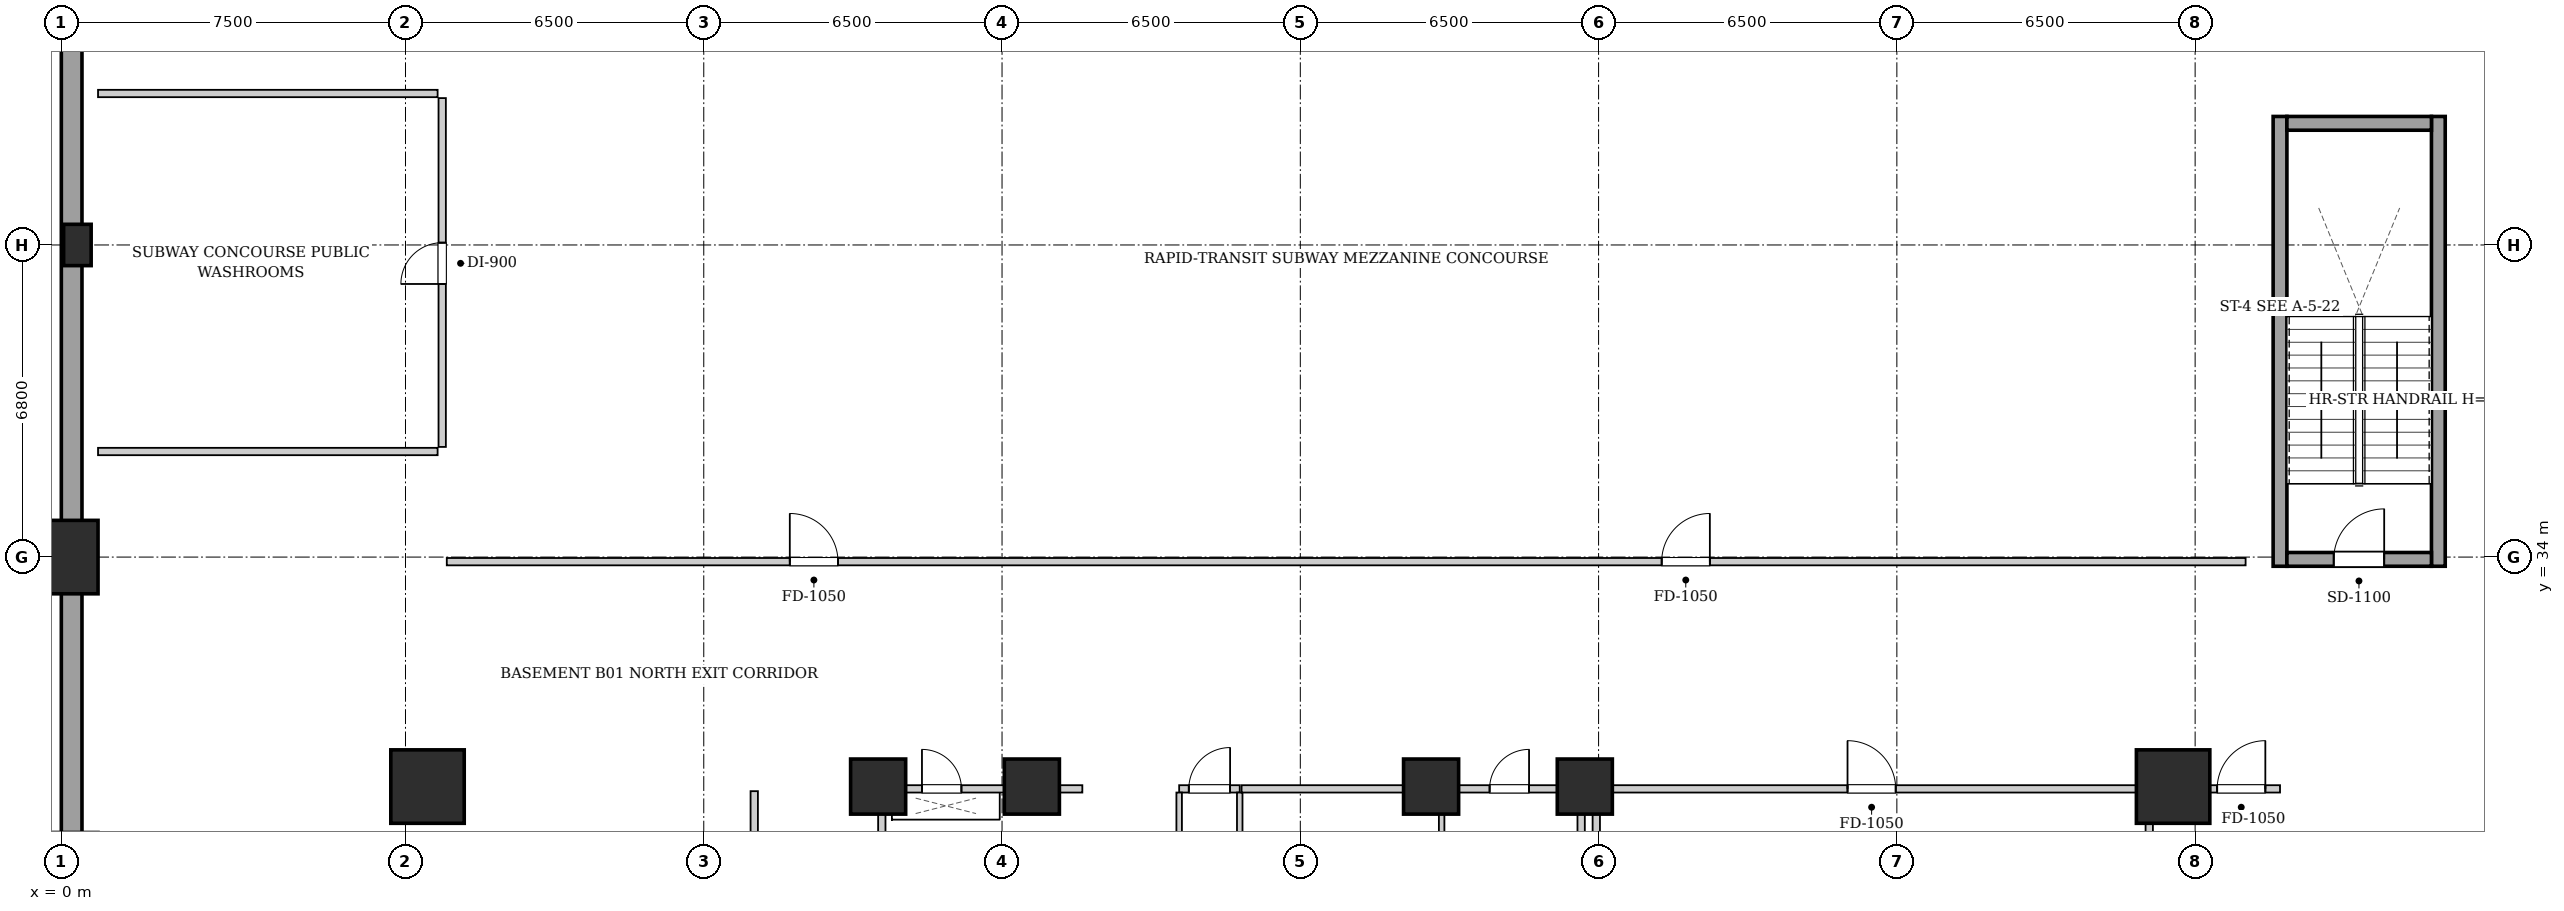
"""IFC4 building model, lengths in metres.
Left out: names, types, materials, properties, quantities, classifications, styles, units other than length and angle.
Written with IfcOpenShell. Run it as: python <this file> out.ifc"""

import sys

from ifc_helpers import new_model, si_unit, direction, frame, frame_2d, origin, origin_2d, place, context, subcontext, project, spatial, rectangle, extrude, element, fill, save


model = new_model("IFC4")
c1 = context("Model", 3, precision=1e-05, world=origin(), true_north=direction((0.0, 1.0)))
c2 = subcontext(c1, "Body", "Model", "MODEL_VIEW")
j1 = project(units=[si_unit("LENGTHUNIT", "METRE"), si_unit("PLANEANGLEUNIT", "RADIAN")], contexts=[c1])
p1 = place(None, origin())
s1 = spatial("IfcSite", under=j1, at=p1, CompositionType="ELEMENT")
p2 = place(p1, origin())
s2 = spatial("IfcBuilding", under=s1, at=p2, CompositionType="ELEMENT")
p3 = place(p2, frame((0.0, 0.0, -4.8)))
s3 = spatial("IfcBuildingStorey", under=s2, at=p3, CompositionType="ELEMENT", Elevation=-4.8)
for number, where, z_axis, x_axis in (
    (1, (0.0, 34.0, 0.0), (0.0, 0.0, 1.0), (1.0, 0.0, 0.0)),
    (2, (7.98, 29.0, 0.0), (0.0, 0.0, 1.0), (1.0, 0.0, 0.0)),
    (3, (46.02, 29.0, 0.0), (0.0, 0.0, 1.0), (1.0, 0.0, 0.0)),
):
    element("IfcColumn", number, at=place(p3, frame(where, z_axis=z_axis, x_axis=x_axis)), inside=s3, PredefinedType="COLUMN", context=c2, shape_type="SweptSolid", body=[
        extrude(rectangle(XDim=1.6, YDim=1.6, at=origin_2d()), origin(), (0.0, 0.0, 1.0), 4.8),
    ])
for number, where, z_axis, x_axis in (
    (4, (17.8, 29.0, 0.0), (0.0, 0.0, 1.0), (1.0, 0.0, 0.0)),
    (5, (21.15, 29.0, 0.0), (0.0, 0.0, 1.0), (1.0, 0.0, 0.0)),
    (6, (29.85, 29.0, 0.0), (0.0, 0.0, 1.0), (1.0, 0.0, 0.0)),
    (7, (33.2, 29.0, 0.0), (0.0, 0.0, 1.0), (1.0, 0.0, 0.0)),
):
    element("IfcColumn", number, at=place(p3, frame(where, z_axis=z_axis, x_axis=x_axis)), inside=s3, PredefinedType="COLUMN", context=c2, shape_type="SweptSolid", body=[
        extrude(rectangle(XDim=1.2, YDim=1.2, at=origin_2d()), origin(), (0.0, 0.0, 1.0), 4.8),
    ])
p4 = place(p3, frame((0.35, 40.8, 0.0), z_axis=(0.0, 0.0, 1.0), x_axis=(1.0, 0.0, 0.0)))
e8 = element("IfcColumn", 8, at=p4, inside=s3, PredefinedType="PILASTER", context=c2, shape_type="SweptSolid", body=[
    extrude(rectangle(XDim=0.6, YDim=0.9, at=origin_2d()), origin(), (0.0, 0.0, 1.0), 4.8),
])
p5 = place(p3, frame((0.225, 0.0, 0.0), z_axis=(0.0, 0.0, 1.0), x_axis=(0.0, 1.0, 0.0)))
e9 = element("IfcWall", 9, at=p5, inside=s3, PredefinedType="USERDEFINED", context=c2, shape_type="SweptSolid", body=[
    extrude(rectangle(XDim=47.6, YDim=0.45, at=frame_2d((23.8, 0.0))), origin(), (0.0, 0.0, 1.0), 4.48),
])
for number, where, z_axis, x_axis in (
    (10, (48.35, 33.8, 0.0), (0.0, 0.0, 1.0), (0.0, 1.0, 0.0)),
    (11, (51.8, 33.8, 0.0), (0.0, 0.0, 1.0), (0.0, 1.0, 0.0)),
):
    element("IfcWall", number, at=place(p3, frame(where, z_axis=z_axis, x_axis=x_axis)), inside=s3, PredefinedType="SHEAR", context=c2, shape_type="SweptSolid", body=[
        extrude(rectangle(XDim=9.8, YDim=0.3, at=frame_2d((4.9, 0.0))), origin(), (0.0, 0.0, 1.0), 4.48),
    ])
p6 = place(p3, frame((48.5, 43.45, 0.0), z_axis=(0.0, 0.0, 1.0), x_axis=(1.0, 0.0, 0.0)))
e12 = element("IfcWall", 12, at=p6, inside=s3, PredefinedType="SHEAR", context=c2, shape_type="SweptSolid", body=[
    extrude(rectangle(XDim=3.15, YDim=0.3, at=frame_2d((1.575, 0.0))), origin(), (0.0, 0.0, 1.0), 4.48),
])
p7 = place(p3, frame((48.5, 33.95, 0.0), z_axis=(0.0, 0.0, 1.0), x_axis=(1.0, 0.0, 0.0)))
e13 = element("IfcWall", 13, at=p7, inside=s3, PredefinedType="SHEAR", context=c2, shape_type="SweptSolid", body=[
    extrude(rectangle(XDim=3.15, YDim=0.3, at=frame_2d((1.575, 0.0))), origin(), (0.0, 0.0, 1.0), 4.48),
])
p8 = place(p7, frame((1.02, 0.0, 0.0)))
e14 = element("IfcOpeningElement", 14, at=p8, cuts=e13, PredefinedType="OPENING", context=c2, shape_type="SweptSolid", body=[
    extrude(rectangle(XDim=1.1, YDim=2.05, at=frame_2d((0.55, 1.025))), frame((0.0, 0.16, 0.0), z_axis=(0.0, -1.0, 0.0), x_axis=(1.0, 0.0, 0.0)), (0.0, 0.0, 1.0), 0.32),
])
for number, where, z_axis, x_axis in (
    (15, (17.88, 24.12, 0.0), (0.0, 0.0, 1.0), (0.0, 1.0, 0.0)),
    (16, (33.12, 24.12, 0.0), (0.0, 0.0, 1.0), (0.0, 1.0, 0.0)),
):
    element("IfcWall", number, at=place(p3, frame(where, z_axis=z_axis, x_axis=x_axis)), inside=s3, PredefinedType="PARTITIONING", context=c2, shape_type="SweptSolid", body=[
        extrude(rectangle(XDim=4.76, YDim=0.16, at=frame_2d((2.38, 0.0))), origin(), (0.0, 0.0, 1.0), 4.48),
    ])
p9 = place(p3, frame((24.36, 28.95, 0.0), z_axis=(0.0, 0.0, 1.0), x_axis=(1.0, 0.0, 0.0)))
e17 = element("IfcWall", 17, at=p9, inside=s3, PredefinedType="PARTITIONING", context=c2, shape_type="SweptSolid", body=[
    extrude(rectangle(XDim=1.32, YDim=0.16, at=frame_2d((0.66, 0.0))), origin(), (0.0, 0.0, 1.0), 4.48),
])
p10 = place(p9, frame((0.21, 0.0, 0.0)))
e18 = element("IfcOpeningElement", 18, at=p10, cuts=e17, PredefinedType="OPENING", context=c2, shape_type="SweptSolid", body=[
    extrude(rectangle(XDim=0.9, YDim=2.05, at=frame_2d((0.45, 1.025))), frame((0.0, 0.09, 0.0), z_axis=(0.0, -1.0, 0.0), x_axis=(1.0, 0.0, 0.0)), (0.0, 0.0, 1.0), 0.18),
])
p11 = place(p3, frame((17.96, 28.95, 0.0), z_axis=(0.0, 0.0, 1.0), x_axis=(1.0, 0.0, 0.0)))
e19 = element("IfcWall", 19, at=p11, inside=s3, PredefinedType="PARTITIONING", context=c2, shape_type="SweptSolid", body=[
    extrude(rectangle(XDim=4.29, YDim=0.16, at=frame_2d((2.145, 0.0))), origin(), (0.0, 0.0, 1.0), 4.48),
])
p12 = place(p11, frame((0.795, 0.0, 0.0)))
e20 = element("IfcOpeningElement", 20, at=p12, cuts=e19, PredefinedType="OPENING", context=c2, shape_type="SweptSolid", body=[
    extrude(rectangle(XDim=0.86, YDim=2.05, at=frame_2d((0.43, 1.025))), frame((0.0, 0.09, 0.0), z_axis=(0.0, -1.0, 0.0), x_axis=(1.0, 0.0, 0.0)), (0.0, 0.0, 1.0), 0.18),
])
for number, where, z_axis, x_axis in (
    (21, (24.36, 26.6, 0.0), (0.0, 0.0, 1.0), (0.0, 1.0, 0.0)),
    (22, (25.68, 26.6, 0.0), (0.0, 0.0, 1.0), (0.0, 1.0, 0.0)),
):
    element("IfcWall", number, at=place(p3, frame(where, z_axis=z_axis, x_axis=x_axis)), inside=s3, PredefinedType="PARTITIONING", context=c2, shape_type="SweptSolid", body=[
        extrude(rectangle(XDim=2.27, YDim=0.12, at=frame_2d((1.135, 0.0))), origin(), (0.0, 0.0, 1.0), 4.48),
    ])
p13 = place(p3, frame((30.08, 26.18, 0.0), z_axis=(0.0, 0.0, 1.0), x_axis=(0.0, 1.0, 0.0)))
e23 = element("IfcWall", 23, at=p13, inside=s3, PredefinedType="PARTITIONING", context=c2, shape_type="SweptSolid", body=[
    extrude(rectangle(XDim=2.68, YDim=0.12, at=frame_2d((1.34, 0.0))), origin(), (0.0, 0.0, 1.0), 4.48),
])
p14 = place(p3, frame((30.08, 28.95, 0.0), z_axis=(0.0, 0.0, 1.0), x_axis=(1.0, 0.0, 0.0)))
e24 = element("IfcWall", 24, at=p14, inside=s3, PredefinedType="PARTITIONING", context=c2, shape_type="SweptSolid", body=[
    extrude(rectangle(XDim=2.96, YDim=0.16, at=frame_2d((1.48, 0.0))), origin(), (0.0, 0.0, 1.0), 4.48),
])
p15 = place(p14, frame((1.045, 0.0, 0.0)))
e25 = element("IfcOpeningElement", 25, at=p15, cuts=e24, PredefinedType="OPENING", context=c2, shape_type="SweptSolid", body=[
    extrude(rectangle(XDim=0.86, YDim=2.05, at=frame_2d((0.43, 1.025))), frame((0.0, 0.09, 0.0), z_axis=(0.0, -1.0, 0.0), x_axis=(1.0, 0.0, 0.0)), (0.0, 0.0, 1.0), 0.18),
])
p16 = place(p3, frame((25.72, 28.95, 0.0), z_axis=(0.0, 0.0, 1.0), x_axis=(1.0, 0.0, 0.0)))
e26 = element("IfcWall", 26, at=p16, inside=s3, PredefinedType="PARTITIONING", context=c2, shape_type="SweptSolid", body=[
    extrude(rectangle(XDim=4.3, YDim=0.16, at=frame_2d((2.15, 0.0))), origin(), (0.0, 0.0, 1.0), 4.48),
])
p17 = place(p3, frame((8.4, 33.9, 0.0), z_axis=(0.0, 0.0, 1.0), x_axis=(1.0, 0.0, 0.0)))
e27 = element("IfcWall", 27, at=p17, inside=s3, PredefinedType="PARTITIONING", context=c2, shape_type="SweptSolid", body=[
    extrude(rectangle(XDim=39.2, YDim=0.16, at=frame_2d((19.6, 0.0))), origin(), (0.0, 0.0, 1.0), 4.48),
])
p18 = place(p17, frame((7.475, 0.0, 0.0)))
e28 = element("IfcOpeningElement", 28, at=p18, cuts=e27, PredefinedType="OPENING", context=c2, shape_type="SweptSolid", body=[
    extrude(rectangle(XDim=1.05, YDim=2.05, at=frame_2d((0.525, 1.025))), frame((0.0, 0.09, 0.0), z_axis=(0.0, -1.0, 0.0), x_axis=(1.0, 0.0, 0.0)), (0.0, 0.0, 1.0), 0.18),
])
p19 = place(p17, frame((26.475, 0.0, 0.0)))
e29 = element("IfcOpeningElement", 29, at=p19, cuts=e27, PredefinedType="OPENING", context=c2, shape_type="SweptSolid", body=[
    extrude(rectangle(XDim=1.05, YDim=2.05, at=frame_2d((0.525, 1.025))), frame((0.0, 0.09, 0.0), z_axis=(0.0, -1.0, 0.0), x_axis=(1.0, 0.0, 0.0)), (0.0, 0.0, 1.0), 0.18),
])
p20 = place(p3, frame((8.3, 36.4, 0.0), z_axis=(0.0, 0.0, 1.0), x_axis=(0.0, 1.0, 0.0)))
e30 = element("IfcWall", 30, at=p20, inside=s3, PredefinedType="PARTITIONING", context=c2, shape_type="SweptSolid", body=[
    extrude(rectangle(XDim=7.6, YDim=0.16, at=frame_2d((3.8, 0.0))), origin(), (0.0, 0.0, 1.0), 4.48),
])
p21 = place(p20, frame((3.55, 0.0, 0.0)))
e31 = element("IfcOpeningElement", 31, at=p21, cuts=e30, PredefinedType="OPENING", context=c2, shape_type="SweptSolid", body=[
    extrude(rectangle(XDim=0.9, YDim=2.05, at=frame_2d((0.45, 1.025))), frame((0.0, 0.09, 0.0), z_axis=(0.0, -1.0, 0.0), x_axis=(1.0, 0.0, 0.0)), (0.0, 0.0, 1.0), 0.18),
])
for number, where, z_axis, x_axis in (
    (32, (0.8, 44.1, 0.0), (0.0, 0.0, 1.0), (1.0, 0.0, 0.0)),
    (33, (0.8, 36.3, 0.0), (0.0, 0.0, 1.0), (1.0, 0.0, 0.0)),
):
    element("IfcWall", number, at=place(p3, frame(where, z_axis=z_axis, x_axis=x_axis)), inside=s3, PredefinedType="PARTITIONING", context=c2, shape_type="SweptSolid", body=[
        extrude(rectangle(XDim=7.4, YDim=0.16, at=frame_2d((3.7, 0.0))), origin(), (0.0, 0.0, 1.0), 4.48),
    ])
p22 = place(p3, frame((15.1, 15.1, 0.0), z_axis=(0.0, 0.0, 1.0), x_axis=(0.0, 1.0, 0.0)))
e34 = element("IfcWall", 34, at=p22, inside=s3, PredefinedType="PARTITIONING", context=c2, shape_type="SweptSolid", body=[
    extrude(rectangle(XDim=13.8, YDim=0.16, at=frame_2d((6.9, 0.0))), origin(), (0.0, 0.0, 1.0), 4.48),
])
p23 = place(p22, frame((6.475, 0.0, 0.0)))
e35 = element("IfcOpeningElement", 35, at=p23, cuts=e34, PredefinedType="OPENING", context=c2, shape_type="SweptSolid", body=[
    extrude(rectangle(XDim=1.05, YDim=2.05, at=frame_2d((0.525, 1.025))), frame((0.0, 0.09, 0.0), z_axis=(0.0, -1.0, 0.0), x_axis=(1.0, 0.0, 0.0)), (0.0, 0.0, 1.0), 0.18),
])
p24 = place(p3, frame((33.45, 28.95, 0.0), z_axis=(0.0, 0.0, 1.0), x_axis=(1.0, 0.0, 0.0)))
e36 = element("IfcWall", 36, at=p24, inside=s3, PredefinedType="PARTITIONING", context=c2, shape_type="SweptSolid", body=[
    extrude(rectangle(XDim=12.05, YDim=0.16, at=frame_2d((6.025, 0.0))), origin(), (0.0, 0.0, 1.0), 3.565),
])
p25 = place(p24, frame((5.475, 0.0, 0.0)))
e37 = element("IfcOpeningElement", 37, at=p25, cuts=e36, PredefinedType="OPENING", context=c2, shape_type="SweptSolid", body=[
    extrude(rectangle(XDim=1.05, YDim=2.05, at=frame_2d((0.525, 1.025))), frame((0.0, 0.09, 0.0), z_axis=(0.0, -1.0, 0.0), x_axis=(1.0, 0.0, 0.0)), (0.0, 0.0, 1.0), 0.18),
])
p26 = place(p3, frame((33.45, 15.1, 0.0), z_axis=(0.0, 0.0, 1.0), x_axis=(0.0, 1.0, 0.0)))
e38 = element("IfcWall", 38, at=p26, inside=s3, PredefinedType="PARTITIONING", context=c2, shape_type="SweptSolid", body=[
    extrude(rectangle(XDim=13.78, YDim=0.16, at=frame_2d((6.89, 0.0))), origin(), (0.0, 0.0, 1.0), 4.48),
])
p27 = place(p3, frame((45.5, 8.0, 0.0), z_axis=(0.0, 0.0, 1.0), x_axis=(0.0, 1.0, 0.0)))
e39 = element("IfcWall", 39, at=p27, inside=s3, PredefinedType="PARTITIONING", context=c2, shape_type="SweptSolid", body=[
    extrude(rectangle(XDim=20.95, YDim=0.16, at=frame_2d((10.475, 0.0))), origin(), (0.0, 0.0, 1.0), 4.48),
])
p28 = place(p3, frame((45.6, 28.95, 0.0), z_axis=(0.0, 0.0, 1.0), x_axis=(1.0, 0.0, 0.0)))
e40 = element("IfcWall", 40, at=p28, inside=s3, PredefinedType="PARTITIONING", context=c2, shape_type="SweptSolid", body=[
    extrude(rectangle(XDim=2.75, YDim=0.16, at=frame_2d((1.375, 0.0))), origin(), (0.0, 0.0, 1.0), 3.565),
])
p29 = place(p28, frame((1.38, 0.0, 0.0)))
e41 = element("IfcOpeningElement", 41, at=p29, cuts=e40, PredefinedType="OPENING", context=c2, shape_type="SweptSolid", body=[
    extrude(rectangle(XDim=1.05, YDim=2.05, at=frame_2d((0.525, 1.025))), frame((0.0, 0.09, 0.0), z_axis=(0.0, -1.0, 0.0), x_axis=(1.0, 0.0, 0.0)), (0.0, 0.0, 1.0), 0.18),
])
p30 = place(p8, origin())
e42 = element("IfcDoor", 42, at=p30, inside=s3, OperationType="SINGLE_SWING_RIGHT", PredefinedType="DOOR", context=c2, shape_type="SweptSolid", body=[
    extrude(rectangle(XDim=1.1, YDim=2.05, at=frame_2d((0.55, 1.025))), frame((0.0, 0.025, 0.0), z_axis=(0.0, -1.0, 0.0), x_axis=(1.0, 0.0, 0.0)), (0.0, 0.0, 1.0), 0.05),
])
fill(e14, e42)
p31 = place(p10, origin())
e43 = element("IfcDoor", 43, at=p31, inside=s3, OperationType="SINGLE_SWING_RIGHT", PredefinedType="DOOR", context=c2, shape_type="SweptSolid", body=[
    extrude(rectangle(XDim=0.9, YDim=2.05, at=frame_2d((0.45, 1.025))), frame((0.0, 0.025, 0.0), z_axis=(0.0, -1.0, 0.0), x_axis=(1.0, 0.0, 0.0)), (0.0, 0.0, 1.0), 0.05),
])
fill(e18, e43)
p32 = place(p12, origin())
e44 = element("IfcDoor", 44, at=p32, inside=s3, OperationType="SINGLE_SWING_LEFT", PredefinedType="DOOR", context=c2, shape_type="SweptSolid", body=[
    extrude(rectangle(XDim=0.86, YDim=2.05, at=frame_2d((0.43, 1.025))), frame((0.0, 0.025, 0.0), z_axis=(0.0, -1.0, 0.0), x_axis=(1.0, 0.0, 0.0)), (0.0, 0.0, 1.0), 0.05),
])
fill(e20, e44)
p33 = place(p15, origin())
e45 = element("IfcDoor", 45, at=p33, inside=s3, OperationType="SINGLE_SWING_RIGHT", PredefinedType="DOOR", context=c2, shape_type="SweptSolid", body=[
    extrude(rectangle(XDim=0.86, YDim=2.05, at=frame_2d((0.43, 1.025))), frame((0.0, 0.025, 0.0), z_axis=(0.0, -1.0, 0.0), x_axis=(1.0, 0.0, 0.0)), (0.0, 0.0, 1.0), 0.05),
])
fill(e25, e45)
p34 = place(p18, origin())
e46 = element("IfcDoor", 46, at=p34, inside=s3, OperationType="SINGLE_SWING_LEFT", PredefinedType="DOOR", context=c2, shape_type="SweptSolid", body=[
    extrude(rectangle(XDim=1.05, YDim=2.05, at=frame_2d((0.525, 1.025))), frame((0.0, 0.025, 0.0), z_axis=(0.0, -1.0, 0.0), x_axis=(1.0, 0.0, 0.0)), (0.0, 0.0, 1.0), 0.05),
])
fill(e28, e46)
p35 = place(p19, origin())
e47 = element("IfcDoor", 47, at=p35, inside=s3, OperationType="SINGLE_SWING_RIGHT", PredefinedType="DOOR", context=c2, shape_type="SweptSolid", body=[
    extrude(rectangle(XDim=1.05, YDim=2.05, at=frame_2d((0.525, 1.025))), frame((0.0, 0.025, 0.0), z_axis=(0.0, -1.0, 0.0), x_axis=(1.0, 0.0, 0.0)), (0.0, 0.0, 1.0), 0.05),
])
fill(e29, e47)
p36 = place(p21, origin())
e48 = element("IfcDoor", 48, at=p36, inside=s3, OperationType="SINGLE_SWING_LEFT", PredefinedType="DOOR", context=c2, shape_type="SweptSolid", body=[
    extrude(rectangle(XDim=0.9, YDim=2.05, at=frame_2d((0.45, 1.025))), frame((0.0, 0.025, 0.0), z_axis=(0.0, -1.0, 0.0), x_axis=(1.0, 0.0, 0.0)), (0.0, 0.0, 1.0), 0.05),
])
fill(e31, e48)
p37 = place(p25, origin())
e49 = element("IfcDoor", 49, at=p37, inside=s3, OperationType="SINGLE_SWING_LEFT", PredefinedType="DOOR", context=c2, shape_type="SweptSolid", body=[
    extrude(rectangle(XDim=1.05, YDim=2.05, at=frame_2d((0.525, 1.025))), frame((0.0, 0.025, 0.0), z_axis=(0.0, -1.0, 0.0), x_axis=(1.0, 0.0, 0.0)), (0.0, 0.0, 1.0), 0.05),
])
fill(e37, e49)
p38 = place(p29, origin())
e50 = element("IfcDoor", 50, at=p38, inside=s3, OperationType="SINGLE_SWING_RIGHT", PredefinedType="DOOR", context=c2, shape_type="SweptSolid", body=[
    extrude(rectangle(XDim=1.05, YDim=2.05, at=frame_2d((0.525, 1.025))), frame((0.0, 0.025, 0.0), z_axis=(0.0, -1.0, 0.0), x_axis=(1.0, 0.0, 0.0)), (0.0, 0.0, 1.0), 0.05),
])
fill(e41, e50)
save(model, sys.argv[1])
